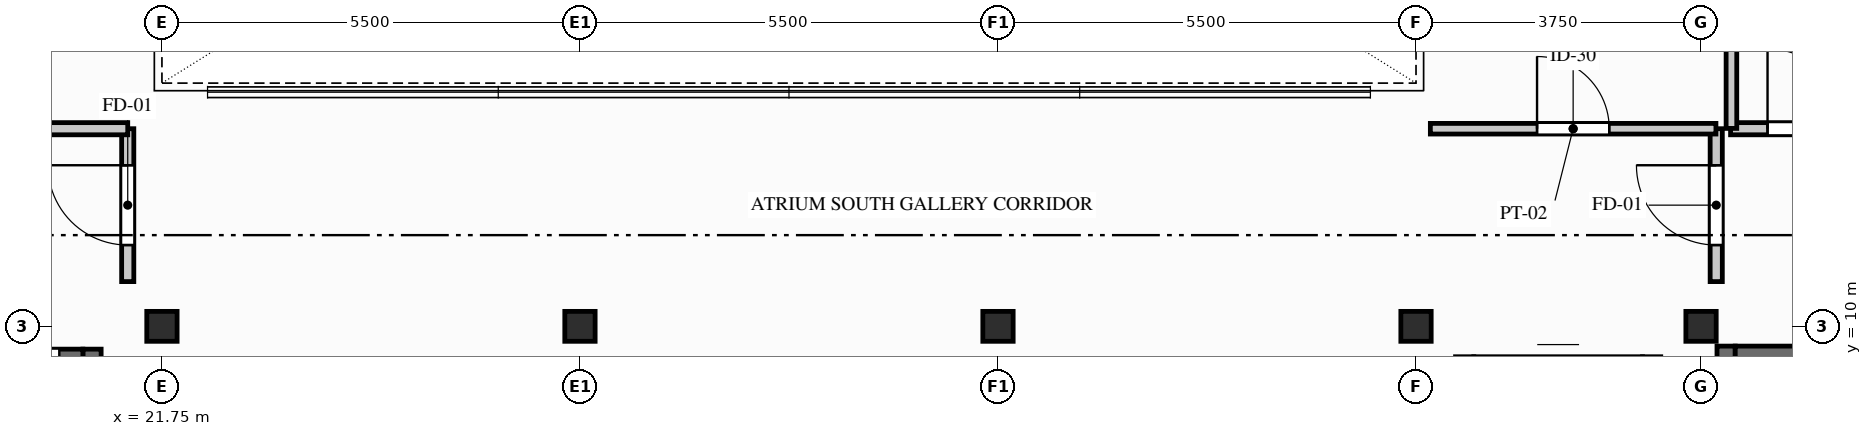
"""IFC4 building model, lengths in metres.
Left out: names, types, materials, properties, quantities, classifications, styles, units other than length and angle.
Written with IfcOpenShell. Run it as: python <this file> out.ifc"""

import sys

from ifc_helpers import new_model, si_unit, direction, frame, frame_2d, origin, origin_2d, place, context, subcontext, project, spatial, rectangle, i_section, extrude, element, fill, save


model = new_model("IFC4")
c1 = context("Model", 3, precision=1e-05, world=origin(), true_north=direction((0.0, 1.0)))
c2 = subcontext(c1, "Body", "Model", "MODEL_VIEW")
j1 = project(units=[si_unit("LENGTHUNIT", "METRE"), si_unit("PLANEANGLEUNIT", "RADIAN")], contexts=[c1])
p1 = place(None, origin())
s1 = spatial("IfcSite", under=j1, at=p1, CompositionType="ELEMENT")
p2 = place(p1, origin())
s2 = spatial("IfcBuilding", under=s1, at=p2, CompositionType="ELEMENT")
p3 = place(p2, frame((0.0, 0.0, 172.8)))
s3 = spatial("IfcBuildingStorey", under=s2, at=p3, CompositionType="ELEMENT", Elevation=172.8)
for number, where, z_axis, x_axis in (
    (1, (21.75, 10.0, 0.0), (0.0, 0.0, 1.0), (1.0, 0.0, 0.0)),
    (2, (27.25, 10.0, 0.0), (0.0, 0.0, 1.0), (1.0, 0.0, 0.0)),
    (3, (32.75, 10.0, 0.0), (0.0, 0.0, 1.0), (1.0, 0.0, 0.0)),
    (4, (38.25, 10.0, 0.0), (0.0, 0.0, 1.0), (1.0, 0.0, 0.0)),
    (5, (42.0, 10.0, 0.0), (0.0, 0.0, 1.0), (1.0, 0.0, 0.0)),
):
    element("IfcColumn", number, at=place(p3, frame(where, z_axis=z_axis, x_axis=x_axis)), inside=s3, PredefinedType="COLUMN", context=c2, shape_type="SweptSolid", body=[
        extrude(i_section(OverallWidth=0.399, OverallDepth=0.394, WebThickness=0.023, FlangeThickness=0.037, FilletRadius=0.015, at=origin_2d()), origin(), (0.0, 0.0, 1.0), 3.1),
    ])
p4 = place(p3, frame((42.33, 2.54, 0.0), z_axis=(0.0, 0.0, 1.0), x_axis=(0.0, 1.0, 0.0)))
e6 = element("IfcWall", 6, at=p4, inside=s3, PredefinedType="SHEAR", context=c2, shape_type="SweptSolid", body=[
    extrude(rectangle(XDim=7.2, YDim=0.24, at=frame_2d((3.6, 0.0))), origin(), (0.0, 0.0, 1.0), 2.89),
])
p5 = place(p3, frame((45.4, 9.62, 0.0), z_axis=(0.0, 0.0, 1.0), x_axis=(-1.0, 0.0, 0.0)))
e7 = element("IfcWall", 7, at=p5, inside=s3, PredefinedType="SHEAR", context=c2, shape_type="SweptSolid", body=[
    extrude(rectangle(XDim=2.95, YDim=0.24, at=frame_2d((1.475, 0.0))), origin(), (0.0, 0.0, 1.0), 2.89),
])
p6 = place(p5, frame((0.95, 0.0, 0.0)))
e8 = element("IfcOpeningElement", 8, at=p6, cuts=e7, PredefinedType="OPENING", context=c2, shape_type="SweptSolid", body=[
    extrude(rectangle(XDim=1.05, YDim=2.06, at=frame_2d((0.525, 1.03))), frame((0.0, 0.13, 0.0), z_axis=(0.0, -1.0, 0.0), x_axis=(1.0, 0.0, 0.0)), (0.0, 0.0, 1.0), 0.26),
])
p7 = place(p3, frame((20.83, 7.0, 0.0), z_axis=(0.0, 0.0, 1.0), x_axis=(0.0, 1.0, 0.0)))
e9 = element("IfcWall", 9, at=p7, inside=s3, PredefinedType="SHEAR", context=c2, shape_type="SweptSolid", body=[
    extrude(rectangle(XDim=2.7, YDim=0.24, at=frame_2d((1.35, 0.0))), origin(), (0.0, 0.0, 1.0), 2.89),
])
p8 = place(p3, frame((18.99, 9.58, 0.0), z_axis=(0.0, 0.0, 1.0), x_axis=(1.0, 0.0, 0.0)))
e10 = element("IfcWall", 10, at=p8, inside=s3, PredefinedType="SHEAR", context=c2, shape_type="SweptSolid", body=[
    extrude(rectangle(XDim=1.72, YDim=0.24, at=frame_2d((0.86, 0.0))), origin(), (0.0, 0.0, 1.0), 2.89),
])
p9 = place(p8, frame((0.31, 0.0, 0.0)))
e11 = element("IfcOpeningElement", 11, at=p9, cuts=e10, PredefinedType="OPENING", context=c2, shape_type="SweptSolid", body=[
    extrude(rectangle(XDim=1.1, YDim=2.06, at=frame_2d((0.55, 1.03))), frame((0.0, 0.13, 0.0), z_axis=(0.0, -1.0, 0.0), x_axis=(1.0, 0.0, 0.0)), (0.0, 0.0, 1.0), 0.26),
])
p10 = place(p3, frame((21.3, 10.589, 0.0), z_axis=(0.0, 0.0, 1.0), x_axis=(0.0, 1.0, 0.0)))
e12 = element("IfcWall", 12, at=p10, inside=s3, PredefinedType="PARTITIONING", context=c2, shape_type="SweptSolid", body=[
    extrude(rectangle(XDim=2.011, YDim=0.16, at=frame_2d((1.006, 0.0))), origin(), (0.0, 0.0, 1.0), 2.89),
])
p11 = place(p10, frame((0.481, 0.0, 0.0)))
e13 = element("IfcOpeningElement", 13, at=p11, cuts=e12, PredefinedType="OPENING", context=c2, shape_type="SweptSolid", body=[
    extrude(rectangle(XDim=1.05, YDim=2.06, at=frame_2d((0.525, 1.03))), frame((0.0, 0.09, 0.0), z_axis=(0.0, -1.0, 0.0), x_axis=(1.0, 0.0, 0.0)), (0.0, 0.0, 1.0), 0.18),
])
p12 = place(p3, frame((17.593, 12.6, 0.0), z_axis=(0.0, 0.0, 1.0), x_axis=(1.0, 0.0, 0.0)))
e14 = element("IfcWall", 14, at=p12, inside=s3, PredefinedType="PARTITIONING", context=c2, shape_type="SweptSolid", body=[
    extrude(rectangle(XDim=3.707, YDim=0.16, at=frame_2d((1.854, 0.0))), origin(), (0.0, 0.0, 1.0), 2.253),
])
p13 = place(p3, frame((42.2, 10.589, 0.0), z_axis=(0.0, 0.0, 1.0), x_axis=(0.0, 1.0, 0.0)))
e15 = element("IfcWall", 15, at=p13, inside=s3, PredefinedType="PARTITIONING", context=c2, shape_type="SweptSolid", body=[
    extrude(rectangle(XDim=2.011, YDim=0.16, at=frame_2d((1.006, 0.0))), origin(), (0.0, 0.0, 1.0), 2.253),
])
p14 = place(p13, frame((0.481, 0.0, 0.0)))
e16 = element("IfcOpeningElement", 16, at=p14, cuts=e15, PredefinedType="OPENING", context=c2, shape_type="SweptSolid", body=[
    extrude(rectangle(XDim=1.05, YDim=2.06, at=frame_2d((0.525, 1.03))), frame((0.0, 0.09, 0.0), z_axis=(0.0, -1.0, 0.0), x_axis=(1.0, 0.0, 0.0)), (0.0, 0.0, 1.0), 0.18),
])
p15 = place(p3, frame((42.389, 12.6, 0.0), z_axis=(0.0, 0.0, 1.0), x_axis=(1.0, 0.0, 0.0)))
e17 = element("IfcWall", 17, at=p15, inside=s3, PredefinedType="PARTITIONING", context=c2, shape_type="SweptSolid", body=[
    extrude(rectangle(XDim=2.023, YDim=0.16, at=frame_2d((1.011, 0.0))), origin(), (0.0, 0.0, 1.0), 2.89),
])
p16 = place(p15, frame((0.486, 0.0, 0.0)))
e18 = element("IfcOpeningElement", 18, at=p16, cuts=e17, PredefinedType="OPENING", context=c2, shape_type="SweptSolid", body=[
    extrude(rectangle(XDim=1.05, YDim=2.06, at=frame_2d((0.525, 1.03))), frame((0.0, 0.09, 0.0), z_axis=(0.0, -1.0, 0.0), x_axis=(1.0, 0.0, 0.0)), (0.0, 0.0, 1.0), 0.18),
])
p17 = place(p3, frame((38.439, 12.6, 0.0), z_axis=(0.0, 0.0, 1.0), x_axis=(1.0, 0.0, 0.0)))
e19 = element("IfcWall", 19, at=p17, inside=s3, PredefinedType="PARTITIONING", context=c2, shape_type="SweptSolid", body=[
    extrude(rectangle(XDim=3.757, YDim=0.14, at=frame_2d((1.879, 0.0))), origin(), (0.0, 0.0, 1.0), 2.253),
])
p18 = place(p17, frame((1.404, 0.0, 0.0)))
e20 = element("IfcOpeningElement", 20, at=p18, cuts=e19, PredefinedType="OPENING", context=c2, shape_type="SweptSolid", body=[
    extrude(rectangle(XDim=0.95, YDim=2.05, at=frame_2d((0.475, 1.025))), frame((0.0, 0.08, 0.0), z_axis=(0.0, -1.0, 0.0), x_axis=(1.0, 0.0, 0.0)), (0.0, 0.0, 1.0), 0.16),
])
p19 = place(p3, frame((42.4, 12.604, 0.0), z_axis=(0.0, 0.0, 1.0), x_axis=(0.0, 1.0, 0.0)))
e21 = element("IfcWall", 21, at=p19, inside=s3, PredefinedType="PARTITIONING", context=c2, shape_type="SweptSolid", body=[
    extrude(rectangle(XDim=10.896, YDim=0.14, at=frame_2d((5.448, 0.0))), origin(), (0.0, 0.0, 1.0), 2.253),
])
p20 = place(p9, origin())
e22 = element("IfcDoor", 22, at=p20, inside=s3, OperationType="SLIDING_TO_RIGHT", PredefinedType="DOOR", context=c2, shape_type="SweptSolid", body=[
    extrude(rectangle(XDim=1.1, YDim=2.06, at=frame_2d((0.55, 1.03))), frame((0.0, 0.025, 0.0), z_axis=(0.0, -1.0, 0.0), x_axis=(1.0, 0.0, 0.0)), (0.0, 0.0, 1.0), 0.05),
])
fill(e11, e22)
p21 = place(p11, origin())
e23 = element("IfcDoor", 23, at=p21, inside=s3, OperationType="SINGLE_SWING_RIGHT", PredefinedType="DOOR", context=c2, shape_type="SweptSolid", body=[
    extrude(rectangle(XDim=1.05, YDim=2.06, at=frame_2d((0.525, 1.03))), frame((0.0, 0.025, 0.0), z_axis=(0.0, -1.0, 0.0), x_axis=(1.0, 0.0, 0.0)), (0.0, 0.0, 1.0), 0.05),
])
fill(e13, e23)
p22 = place(p14, origin())
e24 = element("IfcDoor", 24, at=p22, inside=s3, OperationType="SINGLE_SWING_RIGHT", PredefinedType="DOOR", context=c2, shape_type="SweptSolid", body=[
    extrude(rectangle(XDim=1.05, YDim=2.06, at=frame_2d((0.525, 1.03))), frame((0.0, 0.025, 0.0), z_axis=(0.0, -1.0, 0.0), x_axis=(1.0, 0.0, 0.0)), (0.0, 0.0, 1.0), 0.05),
])
fill(e16, e24)
p23 = place(p16, origin())
e25 = element("IfcDoor", 25, at=p23, inside=s3, OperationType="SINGLE_SWING_LEFT", PredefinedType="DOOR", context=c2, shape_type="SweptSolid", body=[
    extrude(rectangle(XDim=1.05, YDim=2.06, at=frame_2d((0.525, 1.03))), frame((0.0, 0.025, 0.0), z_axis=(0.0, -1.0, 0.0), x_axis=(1.0, 0.0, 0.0)), (0.0, 0.0, 1.0), 0.05),
])
fill(e18, e25)
p24 = place(p18, origin())
e26 = element("IfcDoor", 26, at=p24, inside=s3, OperationType="SINGLE_SWING_LEFT", PredefinedType="DOOR", context=c2, shape_type="SweptSolid", body=[
    extrude(rectangle(XDim=0.95, YDim=2.05, at=frame_2d((0.475, 1.025))), frame((0.0, 0.025, 0.0), z_axis=(0.0, -1.0, 0.0), x_axis=(1.0, 0.0, 0.0)), (0.0, 0.0, 1.0), 0.05),
])
fill(e20, e26)
save(model, sys.argv[1])
